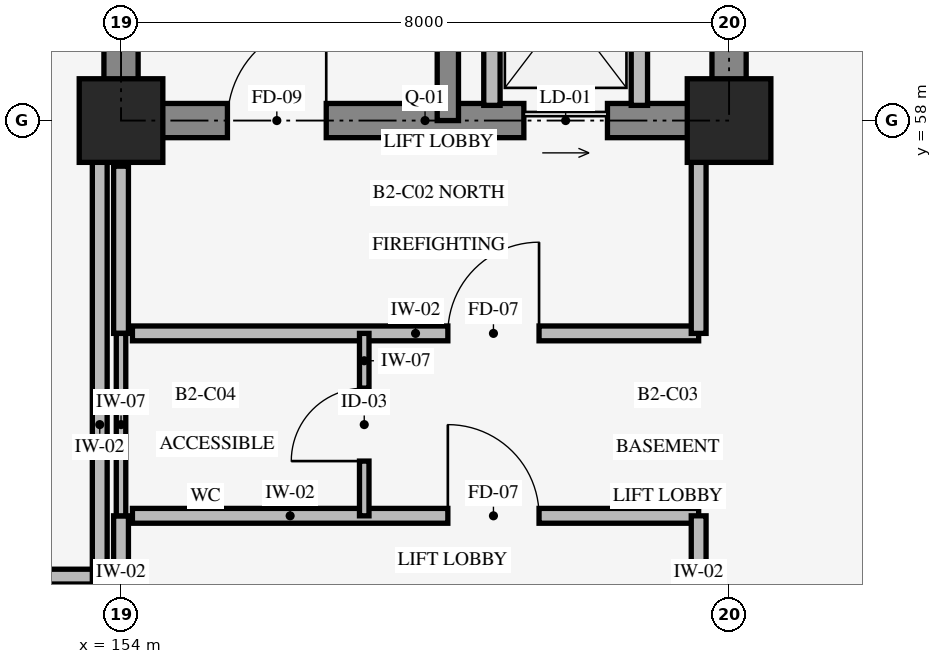
"""IFC4 building model, lengths in metres.
Left out: names, types, materials, properties, quantities, classifications, styles, units other than length and angle.
Written with IfcOpenShell. Run it as: python <this file> out.ifc"""

import sys

from ifc_helpers import new_model, si_unit, direction, frame, frame_2d, origin, origin_2d, place, context, subcontext, project, spatial, rectangle, extrude, element, fill, save


model = new_model("IFC4")
c1 = context("Model", 3, precision=1e-05, world=origin(), true_north=direction((0.0, 1.0)))
c2 = subcontext(c1, "Body", "Model", "MODEL_VIEW")
j1 = project(units=[si_unit("LENGTHUNIT", "METRE"), si_unit("PLANEANGLEUNIT", "RADIAN")], contexts=[c1])
p1 = place(None, origin())
s1 = spatial("IfcSite", under=j1, at=p1, CompositionType="ELEMENT")
p2 = place(p1, origin())
s2 = spatial("IfcBuilding", under=s1, at=p2, CompositionType="ELEMENT")
p3 = place(p2, frame((0.0, 0.0, -9.0)))
s3 = spatial("IfcBuildingStorey", under=s2, at=p3, CompositionType="ELEMENT", Elevation=-9.0)
p4 = place(p3, frame((154.0, 58.0, 0.0), z_axis=(0.0, 0.0, 1.0), x_axis=(1.0, 0.0, 0.0)))
e1 = element("IfcWall", 1, at=p4, inside=s3, PredefinedType="SHEAR", context=c2, shape_type="SweptSolid", body=[
    extrude(rectangle(XDim=8.0, YDim=0.45, at=frame_2d((4.0, 0.0))), origin(), (0.0, 0.0, 1.0), 4.22),
])
p5 = place(p4, frame((1.4, 0.0, 0.0)))
e2 = element("IfcOpeningElement", 2, at=p5, cuts=e1, PredefinedType="OPENING", context=c2, shape_type="SweptSolid", body=[
    extrude(rectangle(XDim=1.3, YDim=2.15, at=frame_2d((0.65, 1.075))), frame((0.0, 0.235, 0.0), z_axis=(0.0, -1.0, 0.0), x_axis=(1.0, 0.0, 0.0)), (0.0, 0.0, 1.0), 0.47),
])
p6 = place(p4, frame((5.3, 0.0, 0.0)))
e3 = element("IfcOpeningElement", 3, at=p6, cuts=e1, PredefinedType="OPENING", context=c2, shape_type="SweptSolid", body=[
    extrude(rectangle(XDim=1.1, YDim=2.2, at=frame_2d((0.55, 1.1))), frame((0.0, 0.235, 0.0), z_axis=(0.0, -1.0, 0.0), x_axis=(1.0, 0.0, 0.0)), (0.0, 0.0, 1.0), 0.47),
])
p7 = place(p3, frame((162.0, 58.0, 0.0), z_axis=(0.0, 0.0, 1.0), x_axis=(0.0, 1.0, 0.0)))
e4 = element("IfcWall", 4, at=p7, inside=s3, PredefinedType="SHEAR", context=c2, shape_type="SweptSolid", body=[
    extrude(rectangle(XDim=8.0, YDim=0.45, at=frame_2d((4.0, 0.0))), origin(), (0.0, 0.0, 1.0), 4.22),
])
p8 = place(p7, frame((3.275, 0.0, 0.0)))
e5 = element("IfcOpeningElement", 5, at=p8, cuts=e4, PredefinedType="OPENING", context=c2, shape_type="SweptSolid", body=[
    extrude(rectangle(XDim=1.05, YDim=2.2, at=frame_2d((0.525, 1.1))), frame((0.0, 0.235, 0.0), z_axis=(0.0, -1.0, 0.0), x_axis=(1.0, 0.0, 0.0)), (0.0, 0.0, 1.0), 0.47),
])
p9 = place(p7, frame((5.45, 0.0, 0.0)))
e6 = element("IfcOpeningElement", 6, at=p9, cuts=e4, PredefinedType="OPENING", context=c2, shape_type="SweptSolid", body=[
    extrude(rectangle(XDim=1.4, YDim=2.3, at=frame_2d((0.7, 1.15))), frame((0.0, 0.235, 0.0), z_axis=(0.0, -1.0, 0.0), x_axis=(1.0, 0.0, 0.0)), (0.0, 0.0, 1.0), 0.47),
])
p10 = place(p3, frame((154.0, 66.0, 0.0), z_axis=(0.0, 0.0, 1.0), x_axis=(0.0, -1.0, 0.0)))
e7 = element("IfcWall", 7, at=p10, inside=s3, PredefinedType="SHEAR", context=c2, shape_type="SweptSolid", body=[
    extrude(rectangle(XDim=8.0, YDim=0.45, at=frame_2d((4.0, 0.0))), origin(), (0.0, 0.0, 1.0), 4.22),
])
p11 = place(p3, frame((158.3, 58.0, 0.0), z_axis=(0.0, 0.0, 1.0), x_axis=(0.0, 1.0, 0.0)))
e8 = element("IfcWall", 8, at=p11, inside=s3, PredefinedType="SHEAR", context=c2, shape_type="SweptSolid", body=[
    extrude(rectangle(XDim=8.0, YDim=0.28, at=frame_2d((4.0, 0.0))), origin(), (0.0, 0.0, 1.0), 4.22),
])
for number, where, z_axis, x_axis in (
    (9, (154.0, 58.0, 0.0), (0.0, 0.0, 1.0), (1.0, 0.0, 0.0)),
    (10, (162.0, 58.0, 0.0), (0.0, 0.0, 1.0), (1.0, 0.0, 0.0)),
):
    element("IfcColumn", number, at=place(p3, frame(where, z_axis=z_axis, x_axis=x_axis)), inside=s3, PredefinedType="COLUMN", context=c2, shape_type="SweptSolid", body=[
        extrude(rectangle(XDim=1.1, YDim=1.1, at=origin_2d()), origin(), (0.0, 0.0, 1.0), 4.5),
    ])
for number, where, z_axis, x_axis in (
    (11, (160.82, 58.2, 0.0), (0.0, 0.0, 1.0), (0.0, 1.0, 0.0)),
    (12, (158.88, 58.2, 0.0), (0.0, 0.0, 1.0), (0.0, 1.0, 0.0)),
):
    element("IfcWall", number, at=place(p3, frame(where, z_axis=z_axis, x_axis=x_axis)), inside=s3, PredefinedType="STANDARD", context=c2, shape_type="SweptSolid", body=[
        extrude(rectangle(XDim=2.55, YDim=0.215, at=frame_2d((1.275, 0.0))), origin(), (0.0, 0.0, 1.0), 4.2),
    ])
p12 = place(p3, frame((154.15, 52.8, 0.0), z_axis=(0.0, 0.0, 1.0), x_axis=(1.0, 0.0, 0.0)))
e13 = element("IfcWall", 13, at=p12, inside=s3, PredefinedType="STANDARD", context=c2, shape_type="SweptSolid", body=[
    extrude(rectangle(XDim=7.45, YDim=0.195, at=frame_2d((3.725, 0.0))), origin(), (0.0, 0.0, 1.0), 4.2),
])
p13 = place(p12, frame((4.15, 0.0, 0.0)))
e14 = element("IfcOpeningElement", 14, at=p13, cuts=e13, PredefinedType="OPENING", context=c2, shape_type="SweptSolid", body=[
    extrude(rectangle(XDim=1.2, YDim=2.1, at=frame_2d((0.6, 1.05))), frame((0.0, 0.107, 0.0), z_axis=(0.0, -1.0, 0.0), x_axis=(1.0, 0.0, 0.0)), (0.0, 0.0, 1.0), 0.215),
])
p14 = place(p3, frame((161.6, 50.15, 0.0), z_axis=(0.0, 0.0, 1.0), x_axis=(0.0, 1.0, 0.0)))
e15 = element("IfcWall", 15, at=p14, inside=s3, PredefinedType="STANDARD", context=c2, shape_type="SweptSolid", body=[
    extrude(rectangle(XDim=2.65, YDim=0.195, at=frame_2d((1.325, 0.0))), origin(), (0.0, 0.0, 1.0), 3.45),
])
p15 = place(p3, frame((154.0, 50.6, 0.0), z_axis=(0.0, 0.0, 1.0), x_axis=(0.0, 1.0, 0.0)))
e16 = element("IfcWall", 16, at=p15, inside=s3, PredefinedType="STANDARD", context=c2, shape_type="SweptSolid", body=[
    extrude(rectangle(XDim=2.2, YDim=0.195, at=frame_2d((1.1, 0.0))), origin(), (0.0, 0.0, 1.0), 3.45),
])
p16 = place(p3, frame((154.15, 55.2, 0.0), z_axis=(0.0, 0.0, 1.0), x_axis=(1.0, 0.0, 0.0)))
e17 = element("IfcWall", 17, at=p16, inside=s3, PredefinedType="STANDARD", context=c2, shape_type="SweptSolid", body=[
    extrude(rectangle(XDim=7.45, YDim=0.195, at=frame_2d((3.725, 0.0))), origin(), (0.0, 0.0, 1.0), 4.2),
])
p17 = place(p16, frame((4.15, 0.0, 0.0)))
e18 = element("IfcOpeningElement", 18, at=p17, cuts=e17, PredefinedType="OPENING", context=c2, shape_type="SweptSolid", body=[
    extrude(rectangle(XDim=1.2, YDim=2.1, at=frame_2d((0.6, 1.05))), frame((0.0, 0.107, 0.0), z_axis=(0.0, -1.0, 0.0), x_axis=(1.0, 0.0, 0.0)), (0.0, 0.0, 1.0), 0.215),
])
p18 = place(p3, frame((161.6, 55.2, 0.0), z_axis=(0.0, 0.0, 1.0), x_axis=(0.0, 1.0, 0.0)))
e19 = element("IfcWall", 19, at=p18, inside=s3, PredefinedType="STANDARD", context=c2, shape_type="SweptSolid", body=[
    extrude(rectangle(XDim=2.65, YDim=0.195, at=frame_2d((1.325, 0.0))), origin(), (0.0, 0.0, 1.0), 3.45),
])
p19 = place(p3, frame((154.0, 55.2, 0.0), z_axis=(0.0, 0.0, 1.0), x_axis=(0.0, 1.0, 0.0)))
e20 = element("IfcWall", 20, at=p19, inside=s3, PredefinedType="STANDARD", context=c2, shape_type="SweptSolid", body=[
    extrude(rectangle(XDim=2.2, YDim=0.195, at=frame_2d((1.1, 0.0))), origin(), (0.0, 0.0, 1.0), 3.45),
])
p20 = place(p3, frame((154.0, 52.8, 0.0), z_axis=(0.0, 0.0, 1.0), x_axis=(0.0, 1.0, 0.0)))
e21 = element("IfcWall", 21, at=p20, inside=s3, PredefinedType="STANDARD", context=c2, shape_type="SweptSolid", body=[
    extrude(rectangle(XDim=2.4, YDim=0.125, at=frame_2d((1.2, 0.0))), origin(), (0.0, 0.0, 1.0), 3.45),
])
p21 = place(p3, frame((157.2, 52.8, 0.0), z_axis=(0.0, 0.0, 1.0), x_axis=(0.0, 1.0, 0.0)))
e22 = element("IfcWall", 22, at=p21, inside=s3, PredefinedType="STANDARD", context=c2, shape_type="SweptSolid", body=[
    extrude(rectangle(XDim=2.4, YDim=0.125, at=frame_2d((1.2, 0.0))), origin(), (0.0, 0.0, 1.0), 4.2),
])
p22 = place(p21, frame((0.72, 0.0, 0.0)))
e23 = element("IfcOpeningElement", 23, at=p22, cuts=e22, PredefinedType="OPENING", context=c2, shape_type="SweptSolid", body=[
    extrude(rectangle(XDim=0.96, YDim=2.08, at=frame_2d((0.48, 1.04))), frame((0.0, 0.073, 0.0), z_axis=(0.0, -1.0, 0.0), x_axis=(1.0, 0.0, 0.0)), (0.0, 0.0, 1.0), 0.145),
])
p23 = place(p3, frame((137.4, 52.0, 0.0), z_axis=(0.0, 0.0, 1.0), x_axis=(1.0, 0.0, 0.0)))
e24 = element("IfcWall", 24, at=p23, inside=s3, PredefinedType="STANDARD", context=c2, shape_type="SweptSolid", body=[
    extrude(rectangle(XDim=16.45, YDim=0.195, at=frame_2d((8.225, 0.0))), origin(), (0.0, 0.0, 1.0), 4.2),
])
p24 = place(p3, frame((153.72, 50.0, 0.0), z_axis=(0.0, 0.0, 1.0), x_axis=(0.0, 1.0, 0.0)))
e25 = element("IfcWall", 25, at=p24, inside=s3, PredefinedType="STANDARD", context=c2, shape_type="SweptSolid", body=[
    extrude(rectangle(XDim=8.0, YDim=0.195, at=frame_2d((4.0, 0.0))), origin(), (0.0, 0.0, 1.0), 3.45),
])
p25 = place(p5, origin())
e26 = element("IfcDoor", 26, at=p25, inside=s3, OperationType="SINGLE_SWING_RIGHT", PredefinedType="DOOR", context=c2, shape_type="SweptSolid", body=[
    extrude(rectangle(XDim=1.3, YDim=2.15, at=frame_2d((0.65, 1.075))), frame((0.0, 0.025, 0.0), z_axis=(0.0, -1.0, 0.0), x_axis=(1.0, 0.0, 0.0)), (0.0, 0.0, 1.0), 0.05),
])
fill(e2, e26)
p26 = place(p6, origin())
e27 = element("IfcDoor", 27, at=p26, inside=s3, OperationType="SLIDING_TO_RIGHT", PredefinedType="DOOR", context=c2, shape_type="SweptSolid", body=[
    extrude(rectangle(XDim=1.1, YDim=2.2, at=frame_2d((0.55, 1.1))), frame((0.0, 0.025, 0.0), z_axis=(0.0, -1.0, 0.0), x_axis=(1.0, 0.0, 0.0)), (0.0, 0.0, 1.0), 0.05),
])
fill(e3, e27)
p27 = place(p13, origin())
e28 = element("IfcDoor", 28, at=p27, inside=s3, OperationType="SINGLE_SWING_LEFT", PredefinedType="DOOR", context=c2, shape_type="SweptSolid", body=[
    extrude(rectangle(XDim=1.2, YDim=2.1, at=frame_2d((0.6, 1.05))), frame((0.0, 0.025, 0.0), z_axis=(0.0, -1.0, 0.0), x_axis=(1.0, 0.0, 0.0)), (0.0, 0.0, 1.0), 0.05),
])
fill(e14, e28)
p28 = place(p17, origin())
e29 = element("IfcDoor", 29, at=p28, inside=s3, OperationType="SINGLE_SWING_RIGHT", PredefinedType="DOOR", context=c2, shape_type="SweptSolid", body=[
    extrude(rectangle(XDim=1.2, YDim=2.1, at=frame_2d((0.6, 1.05))), frame((0.0, 0.025, 0.0), z_axis=(0.0, -1.0, 0.0), x_axis=(1.0, 0.0, 0.0)), (0.0, 0.0, 1.0), 0.05),
])
fill(e18, e29)
p29 = place(p22, origin())
e30 = element("IfcDoor", 30, at=p29, inside=s3, OperationType="SINGLE_SWING_LEFT", PredefinedType="DOOR", context=c2, shape_type="SweptSolid", body=[
    extrude(rectangle(XDim=0.96, YDim=2.08, at=frame_2d((0.48, 1.04))), frame((0.0, 0.025, 0.0), z_axis=(0.0, -1.0, 0.0), x_axis=(1.0, 0.0, 0.0)), (0.0, 0.0, 1.0), 0.05),
])
fill(e23, e30)
save(model, sys.argv[1])
